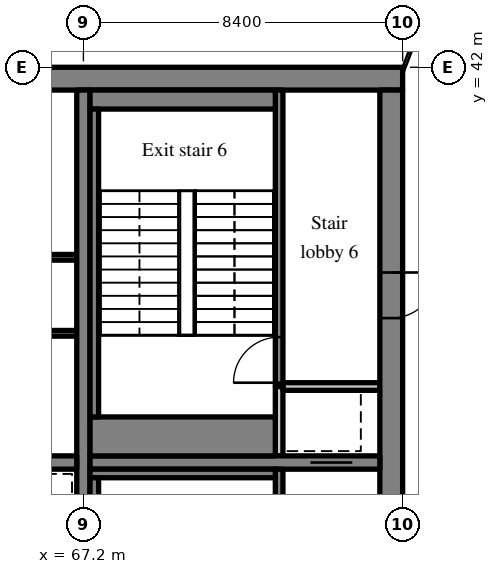
"""IFC4 building model, lengths in metres.
Left out: names, types, materials, properties, quantities, classifications, styles, units other than length and angle.
Written with IfcOpenShell. Run it as: python <this file> out.ifc"""

import sys

from ifc_helpers import new_model, si_unit, direction, frame, frame_2d, origin, place, context, subcontext, project, spatial, rectangle, extrude, source, transform, mapped, element, fill, save


model = new_model("IFC4")
c1 = context("Model", 3, precision=1e-05, world=origin(), true_north=direction((0.0, 1.0)))
c2 = subcontext(c1, "Body", "Model", "MODEL_VIEW")
j1 = project(units=[si_unit("LENGTHUNIT", "METRE"), si_unit("PLANEANGLEUNIT", "RADIAN")], contexts=[c1])
p1 = place(None, origin())
s1 = spatial("IfcSite", under=j1, at=p1, CompositionType="ELEMENT")
p2 = place(p1, origin())
s2 = spatial("IfcBuilding", under=s1, at=p2, CompositionType="ELEMENT")
p3 = place(p2, frame((0.0, 0.0, 237.4)))
s3 = spatial("IfcBuildingStorey", under=s2, at=p3, CompositionType="ELEMENT", Elevation=237.4)
m1 = source(origin(), c2, "Body", "SweptSolid", [
    extrude(rectangle(XDim=50.4, YDim=0.6, at=frame_2d((25.2, 0.0))), origin(), (0.0, 0.0, 1.0), 3.62),
])
p4 = place(p3, frame((25.2, 41.7, 0.0), z_axis=(0.0, 0.0, 1.0), x_axis=(1.0, 0.0, 0.0)))
e1 = element("IfcWall", 1, at=p4, inside=s3, PredefinedType="SHEAR", context=c2, shape_type="MappedRepresentation", body=[
    mapped(m1, transform((0.0, 0.0, 0.0), scale=1.0)),
])
m2 = source(origin(), c2, "Body", "SweptSolid", [
    extrude(rectangle(XDim=18.8, YDim=0.6, at=frame_2d((9.4, 0.0))), origin(), (0.0, 0.0, 1.0), 3.62),
])
p5 = place(p3, frame((75.3, 22.6, 0.0), z_axis=(0.0, 0.0, 1.0), x_axis=(0.0, 1.0, 0.0)))
e2 = element("IfcWall", 2, at=p5, inside=s3, PredefinedType="SHEAR", context=c2, shape_type="MappedRepresentation", body=[
    mapped(m2, transform((0.0, 0.0, 0.0), scale=1.0)),
])
m3 = source(origin(), c2, "Body", "SweptSolid", [
    extrude(rectangle(XDim=1.0, YDim=2.1, at=frame_2d((0.5, 1.05))), frame((0.0, 0.31, 0.0), z_axis=(0.0, -1.0, 0.0), x_axis=(1.0, 0.0, 0.0)), (0.0, 0.0, 1.0), 0.62),
])
p6 = place(p5, frame((2.9, 0.0, 0.0)))
e3 = element("IfcOpeningElement", 3, at=p6, cuts=e2, PredefinedType="OPENING", context=c2, shape_type="MappedRepresentation", body=[
    mapped(m3, transform((0.0, 0.0, 0.0), scale=1.0)),
])
m4 = source(origin(), c2, "Body", "SweptSolid", [
    extrude(rectangle(XDim=1.2, YDim=2.1, at=frame_2d((0.6, 1.05))), frame((0.0, 0.31, 0.0), z_axis=(0.0, -1.0, 0.0), x_axis=(1.0, 0.0, 0.0)), (0.0, 0.0, 1.0), 0.62),
])
p7 = place(p5, frame((12.8, 0.0, 0.0)))
e4 = element("IfcOpeningElement", 4, at=p7, cuts=e2, PredefinedType="OPENING", context=c2, shape_type="MappedRepresentation", body=[
    mapped(m4, transform((0.0, 0.0, 0.0), scale=1.0)),
])
m5 = source(origin(), c2, "Body", "SweptSolid", [
    extrude(rectangle(XDim=18.8, YDim=0.35, at=frame_2d((9.4, 0.0))), origin(), (0.0, 0.0, 1.0), 3.62),
])
p8 = place(p3, frame((67.2, 22.6, 0.0), z_axis=(0.0, 0.0, 1.0), x_axis=(0.0, 1.0, 0.0)))
e5 = element("IfcWall", 5, at=p8, inside=s3, PredefinedType="SHEAR", context=c2, shape_type="MappedRepresentation", body=[
    mapped(m5, transform((0.0, 0.0, 0.0), scale=1.0)),
])
m6 = source(origin(), c2, "Body", "SweptSolid", [
    extrude(rectangle(XDim=16.45, YDim=0.35, at=frame_2d((8.225, 0.0))), origin(), (0.0, 0.0, 1.0), 3.62),
])
p9 = place(p3, frame((50.575, 31.6, 0.0), z_axis=(0.0, 0.0, 1.0), x_axis=(1.0, 0.0, 0.0)))
e6 = element("IfcWall", 6, at=p9, inside=s3, PredefinedType="SHEAR", context=c2, shape_type="MappedRepresentation", body=[
    mapped(m6, transform((0.0, 0.0, 0.0), scale=1.0)),
])
m7 = source(origin(), c2, "Body", "SweptSolid", [
    extrude(rectangle(XDim=1.0, YDim=2.1, at=frame_2d((0.5, 1.05))), frame((0.0, 0.185, 0.0), z_axis=(0.0, -1.0, 0.0), x_axis=(1.0, 0.0, 0.0)), (0.0, 0.0, 1.0), 0.37),
])
p10 = place(p9, frame((0.613, 0.0, 0.0)))
e7 = element("IfcOpeningElement", 7, at=p10, cuts=e6, PredefinedType="OPENING", context=c2, shape_type="MappedRepresentation", body=[
    mapped(m7, transform((0.0, 0.0, 0.0), scale=1.0)),
])
m8 = source(origin(), c2, "Body", "SweptSolid", [
    extrude(rectangle(XDim=7.625, YDim=0.35, at=frame_2d((3.812, 0.0))), origin(), (0.0, 0.0, 1.0), 3.62),
])
p11 = place(p3, frame((67.375, 31.6, 0.0), z_axis=(0.0, 0.0, 1.0), x_axis=(1.0, 0.0, 0.0)))
e8 = element("IfcWall", 8, at=p11, inside=s3, PredefinedType="SHEAR", context=c2, shape_type="MappedRepresentation", body=[
    mapped(m8, transform((0.0, 0.0, 0.0), scale=1.0)),
])
m9 = source(origin(), c2, "Body", "SweptSolid", [
    extrude(rectangle(XDim=1.1, YDim=2.1, at=frame_2d((0.55, 1.05))), frame((0.0, 0.185, 0.0), z_axis=(0.0, -1.0, 0.0), x_axis=(1.0, 0.0, 0.0)), (0.0, 0.0, 1.0), 0.37),
])
p12 = place(p11, frame((5.8, 0.0, 0.0)))
e9 = element("IfcOpeningElement", 9, at=p12, cuts=e8, PredefinedType="OPENING", context=c2, shape_type="MappedRepresentation", body=[
    mapped(m9, transform((0.0, 0.0, 0.0), scale=1.0)),
])
m10 = source(origin(), c2, "Body", "SweptSolid", [
    extrude(rectangle(XDim=14.225, YDim=0.15, at=frame_2d((7.112, 0.0))), origin(), (0.0, 0.0, 1.0), 3.62),
])
p13 = place(p3, frame((67.025, 35.0, 0.0), z_axis=(0.0, 0.0, 1.0), x_axis=(-1.0, 0.0, 0.0)))
e10 = element("IfcWall", 10, at=p13, inside=s3, PredefinedType="PARTITIONING", context=c2, shape_type="MappedRepresentation", body=[
    mapped(m10, transform((0.0, 0.0, 0.0), scale=1.0)),
])
m11 = source(origin(), c2, "Body", "SweptSolid", [
    extrude(rectangle(XDim=0.9, YDim=2.1, at=frame_2d((0.45, 1.05))), frame((0.0, 0.085, 0.0), z_axis=(0.0, -1.0, 0.0), x_axis=(1.0, 0.0, 0.0)), (0.0, 0.0, 1.0), 0.17),
])
p14 = place(p13, frame((2.026, 0.0, 0.0)))
e11 = element("IfcOpeningElement", 11, at=p14, cuts=e10, PredefinedType="OPENING", context=c2, shape_type="MappedRepresentation", body=[
    mapped(m11, transform((0.0, 0.0, 0.0), scale=1.0)),
])
p15 = place(p13, frame((9.101, 0.0, 0.0)))
e12 = element("IfcOpeningElement", 12, at=p15, cuts=e10, PredefinedType="OPENING", context=c2, shape_type="MappedRepresentation", body=[
    mapped(m11, transform((0.0, 0.0, 0.0), scale=1.0)),
])
m12 = source(origin(), c2, "Body", "SweptSolid", [
    extrude(rectangle(XDim=16.45, YDim=0.15, at=frame_2d((8.225, 0.0))), origin(), (0.0, 0.0, 1.0), 3.62),
])
p16 = place(p3, frame((67.025, 37.0, 0.0), z_axis=(0.0, 0.0, 1.0), x_axis=(-1.0, 0.0, 0.0)))
e13 = element("IfcWall", 13, at=p16, inside=s3, PredefinedType="PARTITIONING", context=c2, shape_type="MappedRepresentation", body=[
    mapped(m12, transform((0.0, 0.0, 0.0), scale=1.0)),
])
p17 = place(p16, frame((1.606, 0.0, 0.0)))
e14 = element("IfcOpeningElement", 14, at=p17, cuts=e13, PredefinedType="OPENING", context=c2, shape_type="MappedRepresentation", body=[
    mapped(m11, transform((0.0, 0.0, 0.0), scale=1.0)),
])
p18 = place(p16, frame((7.364, 0.0, 0.0)))
e15 = element("IfcOpeningElement", 15, at=p18, cuts=e13, PredefinedType="OPENING", context=c2, shape_type="MappedRepresentation", body=[
    mapped(m11, transform((0.0, 0.0, 0.0), scale=1.0)),
])
p19 = place(p16, frame((12.299, 0.0, 0.0)))
e16 = element("IfcOpeningElement", 16, at=p19, cuts=e13, PredefinedType="OPENING", context=c2, shape_type="MappedRepresentation", body=[
    mapped(m11, transform((0.0, 0.0, 0.0), scale=1.0)),
])
p20 = place(p16, frame((14.766, 0.0, 0.0)))
e17 = element("IfcOpeningElement", 17, at=p20, cuts=e13, PredefinedType="OPENING", context=c2, shape_type="MappedRepresentation", body=[
    mapped(m11, transform((0.0, 0.0, 0.0), scale=1.0)),
])
m13 = source(origin(), c2, "Body", "SweptSolid", [
    extrude(rectangle(XDim=8.825, YDim=0.2, at=frame_2d((4.413, 0.0))), origin(), (0.0, 0.0, 1.0), 3.62),
])
p21 = place(p3, frame((72.35, 22.6, 0.0), z_axis=(0.0, 0.0, 1.0), x_axis=(0.0, 1.0, 0.0)))
e18 = element("IfcWall", 18, at=p21, inside=s3, PredefinedType="SOLIDWALL", context=c2, shape_type="MappedRepresentation", body=[
    mapped(m13, transform((0.0, 0.0, 0.0), scale=1.0)),
])
m14 = source(origin(), c2, "Body", "SweptSolid", [
    extrude(rectangle(XDim=1.2, YDim=2.1, at=frame_2d((0.6, 1.05))), frame((0.0, 0.11, 0.0), z_axis=(0.0, -1.0, 0.0), x_axis=(1.0, 0.0, 0.0)), (0.0, 0.0, 1.0), 0.22),
])
p22 = place(p21, frame((1.0, 0.0, 0.0)))
e19 = element("IfcOpeningElement", 19, at=p22, cuts=e18, PredefinedType="OPENING", context=c2, shape_type="MappedRepresentation", body=[
    mapped(m14, transform((0.0, 0.0, 0.0), scale=1.0)),
])
m15 = source(origin(), c2, "Body", "SweptSolid", [
    extrude(rectangle(XDim=1.825, YDim=0.2, at=frame_2d((0.913, 0.0))), origin(), (0.0, 0.0, 1.0), 3.62),
])
p23 = place(p3, frame((72.35, 31.775, 0.0), z_axis=(0.0, 0.0, 1.0), x_axis=(0.0, 1.0, 0.0)))
e20 = element("IfcWall", 20, at=p23, inside=s3, PredefinedType="SOLIDWALL", context=c2, shape_type="MappedRepresentation", body=[
    mapped(m15, transform((0.0, 0.0, 0.0), scale=1.0)),
])
m16 = source(origin(), c2, "Body", "SweptSolid", [
    extrude(rectangle(XDim=2.55, YDim=0.2, at=frame_2d((1.275, 0.0))), origin(), (0.0, 0.0, 1.0), 3.62),
])
p24 = place(p3, frame((72.45, 33.6, 0.0), z_axis=(0.0, 0.0, 1.0), x_axis=(1.0, 0.0, 0.0)))
e21 = element("IfcWall", 21, at=p24, inside=s3, PredefinedType="SOLIDWALL", context=c2, shape_type="MappedRepresentation", body=[
    mapped(m16, transform((0.0, 0.0, 0.0), scale=1.0)),
])
m17 = source(origin(), c2, "Body", "SweptSolid", [
    extrude(rectangle(XDim=7.8, YDim=0.2, at=frame_2d((3.9, 0.0))), origin(), (0.0, 0.0, 1.0), 3.62),
])
p25 = place(p3, frame((72.35, 33.6, 0.0), z_axis=(0.0, 0.0, 1.0), x_axis=(0.0, 1.0, 0.0)))
e22 = element("IfcWall", 22, at=p25, inside=s3, PredefinedType="SOLIDWALL", context=c2, shape_type="MappedRepresentation", body=[
    mapped(m17, transform((0.0, 0.0, 0.0), scale=1.0)),
])
p26 = place(p25, frame((0.1, 0.0, 0.0)))
e23 = element("IfcOpeningElement", 23, at=p26, cuts=e22, PredefinedType="OPENING", context=c2, shape_type="MappedRepresentation", body=[
    mapped(m14, transform((0.0, 0.0, 0.0), scale=1.0)),
])
m18 = source(origin(), c2, "Body", "SweptSolid", [
    extrude(rectangle(XDim=4.875, YDim=0.225, at=frame_2d((2.438, 0.0))), origin(), (0.0, 0.0, 1.0), 3.62),
])
p27 = place(p3, frame((67.375, 31.312, 0.0), z_axis=(0.0, 0.0, 1.0), x_axis=(1.0, 0.0, 0.0)))
e24 = element("IfcWall", 24, at=p27, inside=s3, PredefinedType="SOLIDWALL", context=c2, shape_type="MappedRepresentation", body=[
    mapped(m18, transform((0.0, 0.0, 0.0), scale=1.0)),
])
m19 = source(origin(), c2, "Body", "SweptSolid", [
    extrude(rectangle(XDim=8.1, YDim=0.225, at=frame_2d((4.05, 0.0))), origin(), (0.0, 0.0, 1.0), 3.62),
])
p28 = place(p3, frame((67.487, 23.1, 0.0), z_axis=(0.0, 0.0, 1.0), x_axis=(0.0, 1.0, 0.0)))
e25 = element("IfcWall", 25, at=p28, inside=s3, PredefinedType="SOLIDWALL", context=c2, shape_type="MappedRepresentation", body=[
    mapped(m19, transform((0.0, 0.0, 0.0), scale=1.0)),
])
m20 = source(origin(), c2, "Body", "SweptSolid", [
    extrude(rectangle(XDim=4.875, YDim=0.5, at=frame_2d((2.438, 0.0))), origin(), (0.0, 0.0, 1.0), 3.62),
])
p29 = place(p3, frame((67.375, 41.15, 0.0), z_axis=(0.0, 0.0, 1.0), x_axis=(1.0, 0.0, 0.0)))
e26 = element("IfcWall", 26, at=p29, inside=s3, PredefinedType="SOLIDWALL", context=c2, shape_type="MappedRepresentation", body=[
    mapped(m20, transform((0.0, 0.0, 0.0), scale=1.0)),
])
m21 = source(origin(), c2, "Body", "SweptSolid", [
    extrude(rectangle(XDim=4.875, YDim=1.025, at=frame_2d((2.438, 0.0))), origin(), (0.0, 0.0, 1.0), 3.62),
])
p30 = place(p3, frame((67.375, 32.287, 0.0), z_axis=(0.0, 0.0, 1.0), x_axis=(1.0, 0.0, 0.0)))
e27 = element("IfcWall", 27, at=p30, inside=s3, PredefinedType="SOLIDWALL", context=c2, shape_type="MappedRepresentation", body=[
    mapped(m21, transform((0.0, 0.0, 0.0), scale=1.0)),
])
p31 = place(p3, frame((67.487, 32.8, 0.0), z_axis=(0.0, 0.0, 1.0), x_axis=(0.0, 1.0, 0.0)))
e28 = element("IfcWall", 28, at=p31, inside=s3, PredefinedType="SOLIDWALL", context=c2, shape_type="MappedRepresentation", body=[
    mapped(m19, transform((0.0, 0.0, 0.0), scale=1.0)),
])
m22 = source(origin(), c2, "Body", "SweptSolid", [
    extrude(rectangle(XDim=1.1, YDim=2.1, at=frame_2d((0.55, 1.05))), frame((0.0, 0.025, 0.0), z_axis=(0.0, -1.0, 0.0), x_axis=(1.0, 0.0, 0.0)), (0.0, 0.0, 1.0), 0.05),
])
p32 = place(p12, origin())
e29 = element("IfcDoor", 29, at=p32, inside=s3, OperationType="SLIDING_TO_RIGHT", PredefinedType="DOOR", context=c2, shape_type="MappedRepresentation", body=[
    mapped(m22, transform((0.0, 0.0, 0.0), scale=1.0)),
])
fill(e9, e29)
m23 = source(origin(), c2, "Body", "SweptSolid", [
    extrude(rectangle(XDim=1.2, YDim=2.1, at=frame_2d((0.6, 1.05))), frame((0.0, 0.025, 0.0), z_axis=(0.0, -1.0, 0.0), x_axis=(1.0, 0.0, 0.0)), (0.0, 0.0, 1.0), 0.05),
])
p33 = place(p26, origin())
e30 = element("IfcDoor", 30, at=p33, inside=s3, OperationType="SINGLE_SWING_LEFT", PredefinedType="DOOR", context=c2, shape_type="MappedRepresentation", body=[
    mapped(m23, transform((0.0, 0.0, 0.0), scale=1.0)),
])
fill(e23, e30)
p34 = place(p7, origin())
e31 = element("IfcDoor", 31, at=p34, inside=s3, OperationType="SINGLE_SWING_RIGHT", PredefinedType="DOOR", context=c2, shape_type="MappedRepresentation", body=[
    mapped(m23, transform((0.0, 0.0, 0.0), scale=1.0)),
])
fill(e4, e31)
save(model, sys.argv[1])
